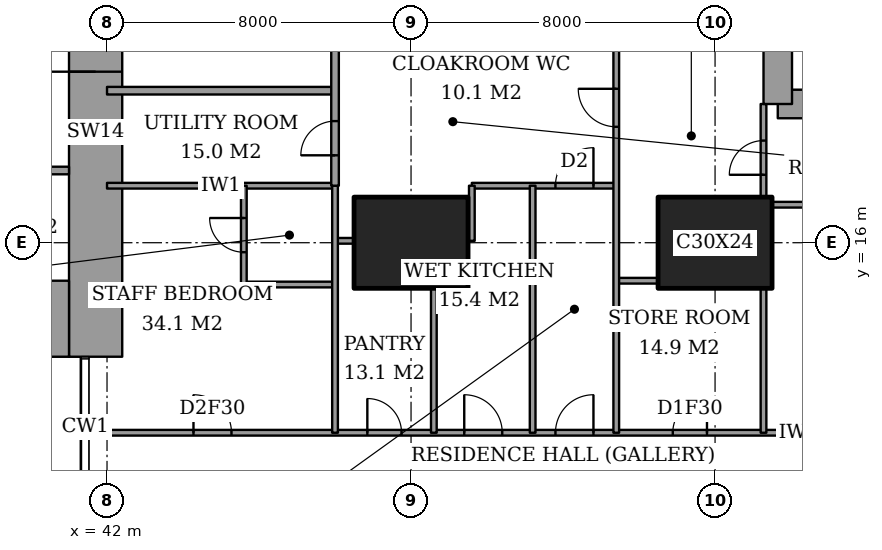
"""IFC4 building model, lengths in metres.
Left out: names, types, materials, properties, quantities, classifications, styles, units other than length and angle.
Written with IfcOpenShell. Run it as: python <this file> out.ifc"""

import sys

from ifc_helpers import new_model, si_unit, direction, frame, frame_2d, origin, origin_2d, place, context, subcontext, project, spatial, rectangle, extrude, element, fill, save


model = new_model("IFC4")
c1 = context("Model", 3, precision=1e-05, world=origin(), true_north=direction((0.0, 1.0)))
c2 = subcontext(c1, "Body", "Model", "MODEL_VIEW")
j1 = project(units=[si_unit("LENGTHUNIT", "METRE"), si_unit("PLANEANGLEUNIT", "RADIAN")], contexts=[c1])
p1 = place(None, origin())
s1 = spatial("IfcSite", under=j1, at=p1, CompositionType="ELEMENT")
p2 = place(p1, origin())
s2 = spatial("IfcBuilding", under=s1, at=p2, CompositionType="ELEMENT")
p3 = place(p2, frame((0.0, 0.0, 153.8)))
s3 = spatial("IfcBuildingStorey", under=s2, at=p3, CompositionType="ELEMENT", Elevation=153.8)
for number, where, z_axis, x_axis in (
    (1, (50.0, 16.0, 0.0), (0.0, 0.0, 1.0), (1.0, 0.0, 0.0)),
    (2, (58.0, 16.0, 0.0), (0.0, 0.0, 1.0), (1.0, 0.0, 0.0)),
):
    element("IfcColumn", number, at=place(p3, frame(where, z_axis=z_axis, x_axis=x_axis)), inside=s3, PredefinedType="COLUMN", context=c2, shape_type="SweptSolid", body=[
        extrude(rectangle(XDim=3.0, YDim=2.4, at=origin_2d()), origin(), (0.0, 0.0, 1.0), 3.6),
    ])
p4 = place(p3, frame((37.85, 14.0, 0.0), z_axis=(0.0, 0.0, 1.0), x_axis=(1.0, 0.0, 0.0)))
e3 = element("IfcWall", 3, at=p4, inside=s3, PredefinedType="SHEAR", context=c2, shape_type="SweptSolid", body=[
    extrude(rectangle(XDim=3.15, YDim=2.0, at=frame_2d((1.575, 0.0))), origin(), (0.0, 0.0, 1.0), 3.6),
])
p5 = place(p3, frame((41.7, 13.0, 0.0), z_axis=(0.0, 0.0, 1.0), x_axis=(0.0, 1.0, 0.0)))
e4 = element("IfcWall", 4, at=p5, inside=s3, PredefinedType="SHEAR", context=c2, shape_type="SweptSolid", body=[
    extrude(rectangle(XDim=11.85, YDim=1.4, at=frame_2d((5.925, 0.0))), origin(), (0.0, 0.0, 1.0), 3.6),
])
p6 = place(p5, frame((7.5, 0.0, 0.0)))
e5 = element("IfcOpeningElement", 5, at=p6, cuts=e4, PredefinedType="OPENING", context=c2, shape_type="SweptSolid", body=[
    extrude(rectangle(XDim=1.8, YDim=2.4, at=frame_2d((0.9, 1.2))), frame((0.0, 0.71, 0.0), z_axis=(0.0, -1.0, 0.0), x_axis=(1.0, 0.0, 0.0)), (0.0, 0.0, 1.0), 1.42),
])
p7 = place(p3, frame((59.65, 19.65, 0.0), z_axis=(0.0, 0.0, 1.0), x_axis=(1.0, 0.0, 0.0)))
e6 = element("IfcWall", 6, at=p7, inside=s3, PredefinedType="SHEAR", context=c2, shape_type="SweptSolid", body=[
    extrude(rectangle(XDim=4.45, YDim=0.75, at=frame_2d((2.225, 0.0))), origin(), (0.0, 0.0, 1.0), 3.6),
])
p8 = place(p3, frame((59.65, 28.35, 0.0), z_axis=(0.0, 0.0, 1.0), x_axis=(0.0, -1.0, 0.0)))
e7 = element("IfcWall", 7, at=p8, inside=s3, PredefinedType="SHEAR", context=c2, shape_type="SweptSolid", body=[
    extrude(rectangle(XDim=8.7, YDim=0.75, at=frame_2d((4.35, 0.0))), origin(), (0.0, 0.0, 1.0), 3.6),
])
p9 = place(p8, frame((0.975, 0.0, 0.0)))
e8 = element("IfcOpeningElement", 8, at=p9, cuts=e7, PredefinedType="OPENING", context=c2, shape_type="SweptSolid", body=[
    extrude(rectangle(XDim=1.0, YDim=2.1, at=frame_2d((0.5, 1.05))), frame((0.0, 0.385, 0.0), z_axis=(0.0, -1.0, 0.0), x_axis=(1.0, 0.0, 0.0)), (0.0, 0.0, 1.0), 0.77),
])
p10 = place(p3, frame((41.439, 11.0, 0.0), z_axis=(0.0, 0.0, 1.0), x_axis=(1.0, 0.0, 0.0)))
e9 = element("IfcWall", 9, at=p10, inside=s3, PredefinedType="PARTITIONING", context=c2, shape_type="SweptSolid", body=[
    extrude(rectangle(XDim=25.011, YDim=0.15, at=frame_2d((12.505, 0.0))), origin(), (0.0, 0.0, 1.0), 3.35),
])
p11 = place(p10, frame((12.361, 0.0, 0.0)))
e10 = element("IfcOpeningElement", 10, at=p11, cuts=e9, PredefinedType="OPENING", context=c2, shape_type="SweptSolid", body=[
    extrude(rectangle(XDim=1.0, YDim=2.1, at=frame_2d((0.5, 1.05))), frame((0.0, 0.085, 0.0), z_axis=(0.0, -1.0, 0.0), x_axis=(1.0, 0.0, 0.0)), (0.0, 0.0, 1.0), 0.17),
])
p12 = place(p10, frame((20.924, 0.0, 0.0)))
e11 = element("IfcOpeningElement", 11, at=p12, cuts=e9, PredefinedType="OPENING", context=c2, shape_type="SweptSolid", body=[
    extrude(rectangle(XDim=1.0, YDim=2.1, at=frame_2d((0.5, 1.05))), frame((0.0, 0.085, 0.0), z_axis=(0.0, -1.0, 0.0), x_axis=(1.0, 0.0, 0.0)), (0.0, 0.0, 1.0), 0.17),
])
p13 = place(p10, frame((15.448, 0.0, 0.0)))
e12 = element("IfcOpeningElement", 12, at=p13, cuts=e9, PredefinedType="OPENING", context=c2, shape_type="SweptSolid", body=[
    extrude(rectangle(XDim=0.9, YDim=2.1, at=frame_2d((0.45, 1.05))), frame((0.0, 0.085, 0.0), z_axis=(0.0, -1.0, 0.0), x_axis=(1.0, 0.0, 0.0)), (0.0, 0.0, 1.0), 0.17),
])
p14 = place(p10, frame((9.961, 0.0, 0.0)))
e13 = element("IfcOpeningElement", 13, at=p14, cuts=e9, PredefinedType="OPENING", context=c2, shape_type="SweptSolid", body=[
    extrude(rectangle(XDim=1.0, YDim=2.1, at=frame_2d((0.5, 1.05))), frame((0.0, 0.085, 0.0), z_axis=(0.0, -1.0, 0.0), x_axis=(1.0, 0.0, 0.0)), (0.0, 0.0, 1.0), 0.17),
])
p15 = place(p10, frame((7.411, 0.0, 0.0)))
e14 = element("IfcOpeningElement", 14, at=p15, cuts=e9, PredefinedType="OPENING", context=c2, shape_type="SweptSolid", body=[
    extrude(rectangle(XDim=0.9, YDim=2.1, at=frame_2d((0.45, 1.05))), frame((0.0, 0.085, 0.0), z_axis=(0.0, -1.0, 0.0), x_axis=(1.0, 0.0, 0.0)), (0.0, 0.0, 1.0), 0.17),
])
p16 = place(p10, frame((2.836, 0.0, 0.0)))
e15 = element("IfcOpeningElement", 15, at=p16, cuts=e9, PredefinedType="OPENING", context=c2, shape_type="SweptSolid", body=[
    extrude(rectangle(XDim=1.0, YDim=2.1, at=frame_2d((0.5, 1.05))), frame((0.0, 0.085, 0.0), z_axis=(0.0, -1.0, 0.0), x_axis=(1.0, 0.0, 0.0)), (0.0, 0.0, 1.0), 0.17),
])
p17 = place(p3, frame((45.6, 14.9, 0.0), z_axis=(0.0, 0.0, 1.0), x_axis=(1.0, 0.0, 0.0)))
e16 = element("IfcWall", 16, at=p17, inside=s3, PredefinedType="PARTITIONING", context=c2, shape_type="SweptSolid", body=[
    extrude(rectangle(XDim=2.4, YDim=0.15, at=frame_2d((1.2, 0.0))), origin(), (0.0, 0.0, 1.0), 3.35),
])
p18 = place(p3, frame((55.4, 15.0, 0.0), z_axis=(0.0, 0.0, 1.0), x_axis=(1.0, 0.0, 0.0)))
e17 = element("IfcWall", 17, at=p18, inside=s3, PredefinedType="PARTITIONING", context=c2, shape_type="SweptSolid", body=[
    extrude(rectangle(XDim=1.1, YDim=0.15, at=frame_2d((0.55, 0.0))), origin(), (0.0, 0.0, 1.0), 3.35),
])
p19 = place(p3, frame((48.0, 16.05, 0.0), z_axis=(0.0, 0.0, 1.0), x_axis=(1.0, 0.0, 0.0)))
e18 = element("IfcWall", 18, at=p19, inside=s3, PredefinedType="PARTITIONING", context=c2, shape_type="SweptSolid", body=[
    extrude(rectangle(XDim=0.5, YDim=0.15, at=frame_2d((0.25, 0.0))), origin(), (0.0, 0.0, 1.0), 2.634),
])
p20 = place(p3, frame((59.5, 17.0, 0.0), z_axis=(0.0, 0.0, 1.0), x_axis=(1.0, 0.0, 0.0)))
e19 = element("IfcWall", 19, at=p20, inside=s3, PredefinedType="PARTITIONING", context=c2, shape_type="SweptSolid", body=[
    extrude(rectangle(XDim=5.15, YDim=0.15, at=frame_2d((2.575, 0.0))), origin(), (0.0, 0.0, 1.0), 3.35),
])
p21 = place(p3, frame((42.0, 17.5, 0.0), z_axis=(0.0, 0.0, 1.0), x_axis=(1.0, 0.0, 0.0)))
e20 = element("IfcWall", 20, at=p21, inside=s3, PredefinedType="PARTITIONING", context=c2, shape_type="SweptSolid", body=[
    extrude(rectangle(XDim=6.0, YDim=0.15, at=frame_2d((3.0, 0.0))), origin(), (0.0, 0.0, 1.0), 3.35),
])
p22 = place(p3, frame((51.6, 17.5, 0.0), z_axis=(0.0, 0.0, 1.0), x_axis=(1.0, 0.0, 0.0)))
e21 = element("IfcWall", 21, at=p22, inside=s3, PredefinedType="PARTITIONING", context=c2, shape_type="SweptSolid", body=[
    extrude(rectangle(XDim=3.8, YDim=0.15, at=frame_2d((1.9, 0.0))), origin(), (0.0, 0.0, 1.0), 3.35),
])
p23 = place(p22, frame((2.2, 0.0, 0.0)))
e22 = element("IfcOpeningElement", 22, at=p23, cuts=e21, PredefinedType="OPENING", context=c2, shape_type="SweptSolid", body=[
    extrude(rectangle(XDim=1.0, YDim=2.1, at=frame_2d((0.5, 1.05))), frame((0.0, 0.085, 0.0), z_axis=(0.0, -1.0, 0.0), x_axis=(1.0, 0.0, 0.0)), (0.0, 0.0, 1.0), 0.17),
])
p24 = place(p3, frame((42.0, 20.0, 0.0), z_axis=(0.0, 0.0, 1.0), x_axis=(1.0, 0.0, 0.0)))
e23 = element("IfcWall", 23, at=p24, inside=s3, PredefinedType="PARTITIONING", context=c2, shape_type="SweptSolid", body=[
    extrude(rectangle(XDim=6.0, YDim=0.2, at=frame_2d((3.0, 0.0))), origin(), (0.0, 0.0, 1.0), 3.35),
])
p25 = place(p3, frame((45.6, 14.9, 0.0), z_axis=(0.0, 0.0, 1.0), x_axis=(0.0, 1.0, 0.0)))
e24 = element("IfcWall", 24, at=p25, inside=s3, PredefinedType="PARTITIONING", context=c2, shape_type="SweptSolid", body=[
    extrude(rectangle(XDim=2.6, YDim=0.15, at=frame_2d((1.3, 0.0))), origin(), (0.0, 0.0, 1.0), 3.35),
])
p26 = place(p25, frame((0.85, 0.0, 0.0)))
e25 = element("IfcOpeningElement", 25, at=p26, cuts=e24, PredefinedType="OPENING", context=c2, shape_type="SweptSolid", body=[
    extrude(rectangle(XDim=0.9, YDim=2.1, at=frame_2d((0.45, 1.05))), frame((0.0, 0.085, 0.0), z_axis=(0.0, -1.0, 0.0), x_axis=(1.0, 0.0, 0.0)), (0.0, 0.0, 1.0), 0.17),
])
p27 = place(p3, frame((48.0, 17.5, 0.0), z_axis=(0.0, 0.0, 1.0), x_axis=(0.0, 1.0, 0.0)))
e26 = element("IfcWall", 26, at=p27, inside=s3, PredefinedType="PARTITIONING", context=c2, shape_type="SweptSolid", body=[
    extrude(rectangle(XDim=6.5, YDim=0.2, at=frame_2d((3.25, 0.0))), origin(), (0.0, 0.0, 1.0), 3.35),
])
p28 = place(p27, frame((3.9, 0.0, 0.0)))
e27 = element("IfcOpeningElement", 27, at=p28, cuts=e26, PredefinedType="OPENING", context=c2, shape_type="SweptSolid", body=[
    extrude(rectangle(XDim=1.2, YDim=2.4, at=frame_2d((0.6, 1.2))), frame((0.0, 0.11, 0.0), z_axis=(0.0, -1.0, 0.0), x_axis=(1.0, 0.0, 0.0)), (0.0, 0.0, 1.0), 0.22),
])
p29 = place(p27, frame((0.8, 0.0, 0.0)))
e28 = element("IfcOpeningElement", 28, at=p29, cuts=e26, PredefinedType="OPENING", context=c2, shape_type="SweptSolid", body=[
    extrude(rectangle(XDim=0.9, YDim=2.1, at=frame_2d((0.45, 1.05))), frame((0.0, 0.11, 0.0), z_axis=(0.0, -1.0, 0.0), x_axis=(1.0, 0.0, 0.0)), (0.0, 0.0, 1.0), 0.22),
])
p30 = place(p3, frame((48.0, 11.0, 0.0), z_axis=(0.0, 0.0, 1.0), x_axis=(0.0, 1.0, 0.0)))
e29 = element("IfcWall", 29, at=p30, inside=s3, PredefinedType="PARTITIONING", context=c2, shape_type="SweptSolid", body=[
    extrude(rectangle(XDim=6.5, YDim=0.15, at=frame_2d((3.25, 0.0))), origin(), (0.0, 0.0, 1.0), 3.35),
])
p31 = place(p3, frame((50.6, 11.0, 0.0), z_axis=(0.0, 0.0, 1.0), x_axis=(0.0, 1.0, 0.0)))
e30 = element("IfcWall", 30, at=p31, inside=s3, PredefinedType="PARTITIONING", context=c2, shape_type="SweptSolid", body=[
    extrude(rectangle(XDim=3.8, YDim=0.15, at=frame_2d((1.9, 0.0))), origin(), (0.0, 0.0, 1.0), 3.35),
])
p32 = place(p3, frame((51.6, 16.05, 0.0), z_axis=(0.0, 0.0, 1.0), x_axis=(0.0, 1.0, 0.0)))
e31 = element("IfcWall", 31, at=p32, inside=s3, PredefinedType="PARTITIONING", context=c2, shape_type="SweptSolid", body=[
    extrude(rectangle(XDim=1.45, YDim=0.15, at=frame_2d((0.725, 0.0))), origin(), (0.0, 0.0, 1.0), 3.35),
])
p33 = place(p3, frame((53.2, 11.0, 0.0), z_axis=(0.0, 0.0, 1.0), x_axis=(0.0, 1.0, 0.0)))
e32 = element("IfcWall", 32, at=p33, inside=s3, PredefinedType="PARTITIONING", context=c2, shape_type="SweptSolid", body=[
    extrude(rectangle(XDim=6.5, YDim=0.15, at=frame_2d((3.25, 0.0))), origin(), (0.0, 0.0, 1.0), 3.35),
])
p34 = place(p3, frame((55.4, 11.0, 0.0), z_axis=(0.0, 0.0, 1.0), x_axis=(0.0, 1.0, 0.0)))
e33 = element("IfcWall", 33, at=p34, inside=s3, PredefinedType="PARTITIONING", context=c2, shape_type="SweptSolid", body=[
    extrude(rectangle(XDim=10.6, YDim=0.15, at=frame_2d((5.3, 0.0))), origin(), (0.0, 0.0, 1.0), 3.35),
])
p35 = place(p34, frame((8.05, 0.0, 0.0)))
e34 = element("IfcOpeningElement", 34, at=p35, cuts=e33, PredefinedType="OPENING", context=c2, shape_type="SweptSolid", body=[
    extrude(rectangle(XDim=1.0, YDim=2.1, at=frame_2d((0.5, 1.05))), frame((0.0, 0.085, 0.0), z_axis=(0.0, -1.0, 0.0), x_axis=(1.0, 0.0, 0.0)), (0.0, 0.0, 1.0), 0.17),
])
p36 = place(p3, frame((59.275, 11.0, 0.0), z_axis=(0.0, 0.0, 1.0), x_axis=(0.0, 1.0, 0.0)))
e35 = element("IfcWall", 35, at=p36, inside=s3, PredefinedType="PARTITIONING", context=c2, shape_type="SweptSolid", body=[
    extrude(rectangle(XDim=3.8, YDim=0.15, at=frame_2d((1.9, 0.0))), origin(), (0.0, 0.0, 1.0), 3.35),
])
p37 = place(p3, frame((59.275, 17.2, 0.0), z_axis=(0.0, 0.0, 1.0), x_axis=(0.0, 1.0, 0.0)))
e36 = element("IfcWall", 36, at=p37, inside=s3, PredefinedType="PARTITIONING", context=c2, shape_type="SweptSolid", body=[
    extrude(rectangle(XDim=2.45, YDim=0.15, at=frame_2d((1.225, 0.0))), origin(), (0.0, 0.0, 1.0), 3.35),
])
p38 = place(p37, frame((0.587, 0.0, 0.0)))
e37 = element("IfcOpeningElement", 37, at=p38, cuts=e36, PredefinedType="OPENING", context=c2, shape_type="SweptSolid", body=[
    extrude(rectangle(XDim=0.9, YDim=2.1, at=frame_2d((0.45, 1.05))), frame((0.0, 0.085, 0.0), z_axis=(0.0, -1.0, 0.0), x_axis=(1.0, 0.0, 0.0)), (0.0, 0.0, 1.0), 0.17),
])
p39 = place(p3, frame((28.3, 17.9, 0.0), z_axis=(0.0, 0.0, 1.0), x_axis=(1.0, 0.0, 0.0)))
e38 = element("IfcWall", 38, at=p39, inside=s3, PredefinedType="PARTITIONING", context=c2, shape_type="SweptSolid", body=[
    extrude(rectangle(XDim=12.7, YDim=0.2, at=frame_2d((6.35, 0.0))), origin(), (0.0, 0.0, 1.0), 3.6),
])
p40 = place(p39, frame((0.95, 0.0, 0.0)))
e39 = element("IfcOpeningElement", 39, at=p40, cuts=e38, PredefinedType="OPENING", context=c2, shape_type="SweptSolid", body=[
    extrude(rectangle(XDim=1.1, YDim=2.1, at=frame_2d((0.55, 1.05))), frame((0.0, 0.11, 0.0), z_axis=(0.0, -1.0, 0.0), x_axis=(1.0, 0.0, 0.0)), (0.0, 0.0, 1.0), 0.22),
])
p41 = place(p39, frame((4.15, 0.0, 0.0)))
e40 = element("IfcOpeningElement", 40, at=p41, cuts=e38, PredefinedType="OPENING", context=c2, shape_type="SweptSolid", body=[
    extrude(rectangle(XDim=1.1, YDim=2.1, at=frame_2d((0.55, 1.05))), frame((0.0, 0.11, 0.0), z_axis=(0.0, -1.0, 0.0), x_axis=(1.0, 0.0, 0.0)), (0.0, 0.0, 1.0), 0.22),
])
p42 = place(p39, frame((7.35, 0.0, 0.0)))
e41 = element("IfcOpeningElement", 41, at=p42, cuts=e38, PredefinedType="OPENING", context=c2, shape_type="SweptSolid", body=[
    extrude(rectangle(XDim=1.1, YDim=2.1, at=frame_2d((0.55, 1.05))), frame((0.0, 0.11, 0.0), z_axis=(0.0, -1.0, 0.0), x_axis=(1.0, 0.0, 0.0)), (0.0, 0.0, 1.0), 0.22),
])
p43 = place(p39, frame((10.6, 0.0, 0.0)))
e42 = element("IfcOpeningElement", 42, at=p43, cuts=e38, PredefinedType="OPENING", context=c2, shape_type="SweptSolid", body=[
    extrude(rectangle(XDim=1.2, YDim=2.1, at=frame_2d((0.6, 1.05))), frame((0.0, 0.11, 0.0), z_axis=(0.0, -1.0, 0.0), x_axis=(1.0, 0.0, 0.0)), (0.0, 0.0, 1.0), 0.22),
])
p44 = place(p11, origin())
e43 = element("IfcDoor", 43, at=p44, inside=s3, OperationType="SINGLE_SWING_LEFT", PredefinedType="DOOR", context=c2, shape_type="SweptSolid", body=[
    extrude(rectangle(XDim=1.0, YDim=2.1, at=frame_2d((0.5, 1.05))), frame((0.0, 0.025, 0.0), z_axis=(0.0, -1.0, 0.0), x_axis=(1.0, 0.0, 0.0)), (0.0, 0.0, 1.0), 0.05),
])
fill(e10, e43)
p45 = place(p38, origin())
e44 = element("IfcDoor", 44, at=p45, inside=s3, OperationType="SINGLE_SWING_RIGHT", PredefinedType="DOOR", context=c2, shape_type="SweptSolid", body=[
    extrude(rectangle(XDim=0.9, YDim=2.1, at=frame_2d((0.45, 1.05))), frame((0.0, 0.025, 0.0), z_axis=(0.0, -1.0, 0.0), x_axis=(1.0, 0.0, 0.0)), (0.0, 0.0, 1.0), 0.05),
])
fill(e37, e44)
p46 = place(p13, origin())
e45 = element("IfcDoor", 45, at=p46, inside=s3, OperationType="SINGLE_SWING_LEFT", PredefinedType="DOOR", context=c2, shape_type="SweptSolid", body=[
    extrude(rectangle(XDim=0.9, YDim=2.1, at=frame_2d((0.45, 1.05))), frame((0.0, 0.025, 0.0), z_axis=(0.0, -1.0, 0.0), x_axis=(1.0, 0.0, 0.0)), (0.0, 0.0, 1.0), 0.05),
])
fill(e12, e45)
p47 = place(p35, origin())
e46 = element("IfcDoor", 46, at=p47, inside=s3, OperationType="SINGLE_SWING_LEFT", PredefinedType="DOOR", context=c2, shape_type="SweptSolid", body=[
    extrude(rectangle(XDim=1.0, YDim=2.1, at=frame_2d((0.5, 1.05))), frame((0.0, 0.025, 0.0), z_axis=(0.0, -1.0, 0.0), x_axis=(1.0, 0.0, 0.0)), (0.0, 0.0, 1.0), 0.05),
])
fill(e34, e46)
p48 = place(p23, origin())
e47 = element("IfcDoor", 47, at=p48, inside=s3, OperationType="SINGLE_SWING_LEFT", PredefinedType="DOOR", context=c2, shape_type="SweptSolid", body=[
    extrude(rectangle(XDim=1.0, YDim=2.1, at=frame_2d((0.5, 1.05))), frame((0.0, 0.025, 0.0), z_axis=(0.0, -1.0, 0.0), x_axis=(1.0, 0.0, 0.0)), (0.0, 0.0, 1.0), 0.05),
])
fill(e22, e47)
p49 = place(p14, origin())
e48 = element("IfcDoor", 48, at=p49, inside=s3, OperationType="SINGLE_SWING_RIGHT", PredefinedType="DOOR", context=c2, shape_type="SweptSolid", body=[
    extrude(rectangle(XDim=1.0, YDim=2.1, at=frame_2d((0.5, 1.05))), frame((0.0, 0.025, 0.0), z_axis=(0.0, -1.0, 0.0), x_axis=(1.0, 0.0, 0.0)), (0.0, 0.0, 1.0), 0.05),
])
fill(e13, e48)
p50 = place(p15, origin())
e49 = element("IfcDoor", 49, at=p50, inside=s3, OperationType="SINGLE_SWING_RIGHT", PredefinedType="DOOR", context=c2, shape_type="SweptSolid", body=[
    extrude(rectangle(XDim=0.9, YDim=2.1, at=frame_2d((0.45, 1.05))), frame((0.0, 0.025, 0.0), z_axis=(0.0, -1.0, 0.0), x_axis=(1.0, 0.0, 0.0)), (0.0, 0.0, 1.0), 0.05),
])
fill(e14, e49)
p51 = place(p26, origin())
e50 = element("IfcDoor", 50, at=p51, inside=s3, OperationType="SINGLE_SWING_LEFT", PredefinedType="DOOR", context=c2, shape_type="SweptSolid", body=[
    extrude(rectangle(XDim=0.9, YDim=2.1, at=frame_2d((0.45, 1.05))), frame((0.0, 0.025, 0.0), z_axis=(0.0, -1.0, 0.0), x_axis=(1.0, 0.0, 0.0)), (0.0, 0.0, 1.0), 0.05),
])
fill(e25, e50)
p52 = place(p16, origin())
e51 = element("IfcDoor", 51, at=p52, inside=s3, OperationType="SINGLE_SWING_RIGHT", PredefinedType="DOOR", context=c2, shape_type="SweptSolid", body=[
    extrude(rectangle(XDim=1.0, YDim=2.1, at=frame_2d((0.5, 1.05))), frame((0.0, 0.025, 0.0), z_axis=(0.0, -1.0, 0.0), x_axis=(1.0, 0.0, 0.0)), (0.0, 0.0, 1.0), 0.05),
])
fill(e15, e51)
p53 = place(p29, origin())
e52 = element("IfcDoor", 52, at=p53, inside=s3, OperationType="SINGLE_SWING_RIGHT", PredefinedType="DOOR", context=c2, shape_type="SweptSolid", body=[
    extrude(rectangle(XDim=0.9, YDim=2.1, at=frame_2d((0.45, 1.05))), frame((0.0, 0.025, 0.0), z_axis=(0.0, -1.0, 0.0), x_axis=(1.0, 0.0, 0.0)), (0.0, 0.0, 1.0), 0.05),
])
fill(e28, e52)
p54 = place(p6, origin())
e53 = element("IfcDoor", 53, at=p54, inside=s3, OperationType="DOUBLE_DOOR_DOUBLE_SWING", PredefinedType="DOOR", context=c2, shape_type="SweptSolid", body=[
    extrude(rectangle(XDim=1.8, YDim=2.4, at=frame_2d((0.9, 1.2))), frame((0.0, 0.025, 0.0), z_axis=(0.0, -1.0, 0.0), x_axis=(1.0, 0.0, 0.0)), (0.0, 0.0, 1.0), 0.05),
])
fill(e5, e53)
save(model, sys.argv[1])
